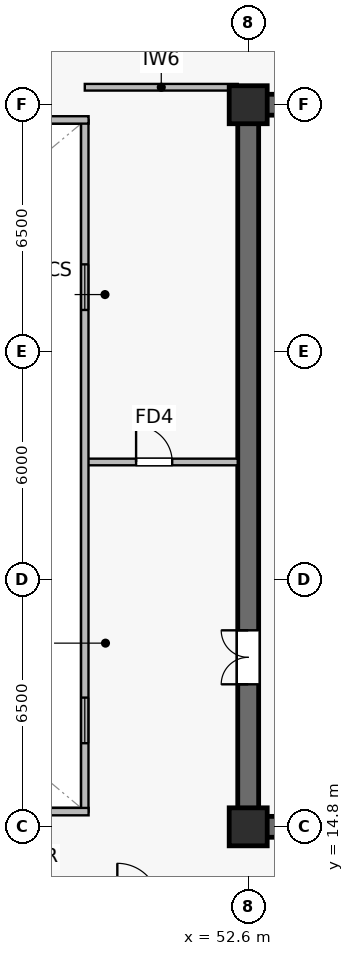
"""IFC4 building model, lengths in metres.
Left out: names, types, materials, properties, quantities, classifications, styles, units other than length and angle.
Written with IfcOpenShell. Run it as: python <this file> out.ifc"""

import sys

from ifc_helpers import new_model, si_unit, direction, frame, frame_2d, origin, origin_2d, place, context, subcontext, project, spatial, rectangle, extrude, source, transform, mapped, element, fill, save


model = new_model("IFC4")
c1 = context("Model", 3, precision=1e-05, world=origin(), true_north=direction((0.0, 1.0)))
c2 = subcontext(c1, "Body", "Model", "MODEL_VIEW")
j1 = project(units=[si_unit("LENGTHUNIT", "METRE"), si_unit("PLANEANGLEUNIT", "RADIAN")], contexts=[c1])
p1 = place(None, origin())
s1 = spatial("IfcSite", under=j1, at=p1, CompositionType="ELEMENT")
p2 = place(p1, origin())
s2 = spatial("IfcBuilding", under=s1, at=p2, CompositionType="ELEMENT")
p3 = place(p2, frame((0.0, 0.0, 221.9)))
s3 = spatial("IfcBuildingStorey", under=s2, at=p3, CompositionType="ELEMENT", Elevation=221.9)
p4 = place(p3, frame((52.325, 14.8, 0.0), z_axis=(0.0, 0.0, 1.0), x_axis=(1.0, 0.0, 0.0)))
e1 = element("IfcWall", 1, at=p4, inside=s3, PredefinedType="SHEAR", context=c2, shape_type="SweptSolid", body=[
    extrude(rectangle(XDim=15.35, YDim=0.55, at=frame_2d((7.675, 0.0))), origin(), (0.0, 0.0, 1.0), 3.8),
])
p5 = place(p3, frame((52.325, 33.8, 0.0), z_axis=(0.0, 0.0, 1.0), x_axis=(1.0, 0.0, 0.0)))
e2 = element("IfcWall", 2, at=p5, inside=s3, PredefinedType="SHEAR", context=c2, shape_type="SweptSolid", body=[
    extrude(rectangle(XDim=15.35, YDim=0.55, at=frame_2d((7.675, 0.0))), origin(), (0.0, 0.0, 1.0), 3.8),
])
p6 = place(p5, frame((8.775, 0.0, 0.0)))
e3 = element("IfcOpeningElement", 3, at=p6, cuts=e2, PredefinedType="OPENING", context=c2, shape_type="SweptSolid", body=[
    extrude(rectangle(XDim=0.95, YDim=2.15, at=frame_2d((0.475, 1.075))), frame((0.0, 0.285, 0.0), z_axis=(0.0, -1.0, 0.0), x_axis=(1.0, 0.0, 0.0)), (0.0, 0.0, 1.0), 0.57),
])
p7 = place(p5, frame((5.41, 0.0, 0.0)))
e4 = element("IfcOpeningElement", 4, at=p7, cuts=e2, PredefinedType="OPENING", context=c2, shape_type="SweptSolid", body=[
    extrude(rectangle(XDim=0.95, YDim=2.15, at=frame_2d((0.475, 1.075))), frame((0.0, 0.285, 0.0), z_axis=(0.0, -1.0, 0.0), x_axis=(1.0, 0.0, 0.0)), (0.0, 0.0, 1.0), 0.57),
])
p8 = place(p5, frame((2.01, 0.0, 0.0)))
e5 = element("IfcOpeningElement", 5, at=p8, cuts=e2, PredefinedType="OPENING", context=c2, shape_type="SweptSolid", body=[
    extrude(rectangle(XDim=0.95, YDim=2.15, at=frame_2d((0.475, 1.075))), frame((0.0, 0.285, 0.0), z_axis=(0.0, -1.0, 0.0), x_axis=(1.0, 0.0, 0.0)), (0.0, 0.0, 1.0), 0.57),
])
p9 = place(p3, frame((52.6, 15.075, 0.0), z_axis=(0.0, 0.0, 1.0), x_axis=(0.0, 1.0, 0.0)))
e6 = element("IfcWall", 6, at=p9, inside=s3, PredefinedType="SHEAR", context=c2, shape_type="SweptSolid", body=[
    extrude(rectangle(XDim=18.45, YDim=0.55, at=frame_2d((9.225, 0.0))), origin(), (0.0, 0.0, 1.0), 3.8),
])
p10 = place(p9, frame((3.475, 0.0, 0.0)))
e7 = element("IfcOpeningElement", 7, at=p10, cuts=e6, PredefinedType="OPENING", context=c2, shape_type="SweptSolid", body=[
    extrude(rectangle(XDim=1.42, YDim=2.2, at=frame_2d((0.71, 1.1))), frame((0.0, 0.285, 0.0), z_axis=(0.0, -1.0, 0.0), x_axis=(1.0, 0.0, 0.0)), (0.0, 0.0, 1.0), 0.57),
])
m1 = source(origin(), c2, "Body", "SweptSolid", [
    extrude(rectangle(XDim=1.0, YDim=1.0, at=origin_2d()), origin(), (0.0, 0.0, 1.0), 4.1),
])
for number, where, z_axis, x_axis in (
    (8, (52.6, 14.8, 0.0), (0.0, 0.0, 1.0), (1.0, 0.0, 0.0)),
    (9, (52.6, 33.8, 0.0), (0.0, 0.0, 1.0), (1.0, 0.0, 0.0)),
):
    element("IfcColumn", number, at=place(p3, frame(where, z_axis=z_axis, x_axis=x_axis)), inside=s3, PredefinedType="COLUMN", context=c2, shape_type="MappedRepresentation", body=[
        mapped(m1, transform((0.0, 0.0, 0.0), scale=1.0)),
    ])
p11 = place(p3, frame((48.3, 34.26, 0.0), z_axis=(0.0, 0.0, 1.0), x_axis=(1.0, 0.0, 0.0)))
e10 = element("IfcWall", 10, at=p11, inside=s3, PredefinedType="PARTITIONING", context=c2, shape_type="SweptSolid", body=[
    extrude(rectangle(XDim=4.025, YDim=0.175, at=frame_2d((2.012, 0.0))), origin(), (0.0, 0.0, 1.0), 3.485),
])
p12 = place(p3, frame((48.3, 24.4, 0.0), z_axis=(0.0, 0.0, 1.0), x_axis=(1.0, 0.0, 0.0)))
e11 = element("IfcWall", 11, at=p12, inside=s3, PredefinedType="PARTITIONING", context=c2, shape_type="SweptSolid", body=[
    extrude(rectangle(XDim=4.025, YDim=0.175, at=frame_2d((2.012, 0.0))), origin(), (0.0, 0.0, 1.0), 3.8),
])
p13 = place(p12, frame((1.35, 0.0, 0.0)))
e12 = element("IfcOpeningElement", 12, at=p13, cuts=e11, PredefinedType="OPENING", context=c2, shape_type="SweptSolid", body=[
    extrude(rectangle(XDim=0.95, YDim=2.15, at=frame_2d((0.475, 1.075))), frame((0.0, 0.098, 0.0), z_axis=(0.0, -1.0, 0.0), x_axis=(1.0, 0.0, 0.0)), (0.0, 0.0, 1.0), 0.195),
])
p14 = place(p3, frame((48.3, 15.2, 0.0), z_axis=(0.0, 0.0, 1.0), x_axis=(0.0, 1.0, 0.0)))
e13 = element("IfcWall", 13, at=p14, inside=s3, PredefinedType="SOLIDWALL", context=c2, shape_type="SweptSolid", body=[
    extrude(rectangle(XDim=18.2, YDim=0.195, at=frame_2d((9.1, 0.0))), origin(), (0.0, 0.0, 1.0), 3.8),
])
p15 = place(p14, frame((1.8, 0.0, 0.9)))
e14 = element("IfcOpeningElement", 14, at=p15, cuts=e13, PredefinedType="OPENING", context=c2, shape_type="SweptSolid", body=[
    extrude(rectangle(XDim=1.2, YDim=1.35, at=frame_2d((0.6, 0.675))), frame((0.0, 0.107, 0.0), z_axis=(0.0, -1.0, 0.0), x_axis=(1.0, 0.0, 0.0)), (0.0, 0.0, 1.0), 0.215),
])
p16 = place(p14, frame((13.2, 0.0, 0.9)))
e15 = element("IfcOpeningElement", 15, at=p16, cuts=e13, PredefinedType="OPENING", context=c2, shape_type="SweptSolid", body=[
    extrude(rectangle(XDim=1.2, YDim=1.35, at=frame_2d((0.6, 0.675))), frame((0.0, 0.107, 0.0), z_axis=(0.0, -1.0, 0.0), x_axis=(1.0, 0.0, 0.0)), (0.0, 0.0, 1.0), 0.215),
])
for number, where, z_axis, x_axis in (
    (16, (26.4, 15.2, 0.0), (0.0, 0.0, 1.0), (1.0, 0.0, 0.0)),
    (17, (26.4, 33.4, 0.0), (0.0, 0.0, 1.0), (1.0, 0.0, 0.0)),
):
    element("IfcWall", number, at=place(p3, frame(where, z_axis=z_axis, x_axis=x_axis)), inside=s3, PredefinedType="SOLIDWALL", context=c2, shape_type="SweptSolid", body=[
        extrude(rectangle(XDim=22.0, YDim=0.195, at=frame_2d((11.0, 0.0))), origin(), (0.0, 0.0, 1.0), 3.8),
    ])
m2 = source(origin(), c2, "Body", "SweptSolid", [
    extrude(rectangle(XDim=1.2, YDim=1.35, at=frame_2d((0.6, 0.675))), frame((0.0, 0.03, 0.0), z_axis=(0.0, -1.0, 0.0), x_axis=(1.0, 0.0, 0.0)), (0.0, 0.0, 1.0), 0.06),
])
p17 = place(p15, origin())
e18 = element("IfcWindow", 18, at=p17, inside=s3, PartitioningType="SINGLE_PANEL", PredefinedType="WINDOW", context=c2, shape_type="MappedRepresentation", body=[
    mapped(m2, transform((0.0, 0.0, 0.0), scale=1.0)),
])
fill(e14, e18)
p18 = place(p16, origin())
e19 = element("IfcWindow", 19, at=p18, inside=s3, PartitioningType="SINGLE_PANEL", PredefinedType="WINDOW", context=c2, shape_type="MappedRepresentation", body=[
    mapped(m2, transform((0.0, 0.0, 0.0), scale=1.0)),
])
fill(e15, e19)
m3 = source(origin(), c2, "Body", "SweptSolid", [
    extrude(rectangle(XDim=1.42, YDim=2.2, at=frame_2d((0.71, 1.1))), frame((0.0, 0.025, 0.0), z_axis=(0.0, -1.0, 0.0), x_axis=(1.0, 0.0, 0.0)), (0.0, 0.0, 1.0), 0.05),
])
p19 = place(p10, origin())
e20 = element("IfcDoor", 20, at=p19, inside=s3, OperationType="DOUBLE_DOOR_SINGLE_SWING", PredefinedType="DOOR", context=c2, shape_type="MappedRepresentation", body=[
    mapped(m3, transform((0.0, 0.0, 0.0), scale=1.0)),
])
fill(e7, e20)
m4 = source(origin(), c2, "Body", "SweptSolid", [
    extrude(rectangle(XDim=0.95, YDim=2.15, at=frame_2d((0.475, 1.075))), frame((0.0, 0.025, 0.0), z_axis=(0.0, -1.0, 0.0), x_axis=(1.0, 0.0, 0.0)), (0.0, 0.0, 1.0), 0.05),
])
p20 = place(p13, origin())
e21 = element("IfcDoor", 21, at=p20, inside=s3, OperationType="SINGLE_SWING_LEFT", PredefinedType="DOOR", context=c2, shape_type="MappedRepresentation", body=[
    mapped(m4, transform((0.0, 0.0, 0.0), scale=1.0)),
])
fill(e12, e21)
save(model, sys.argv[1])
